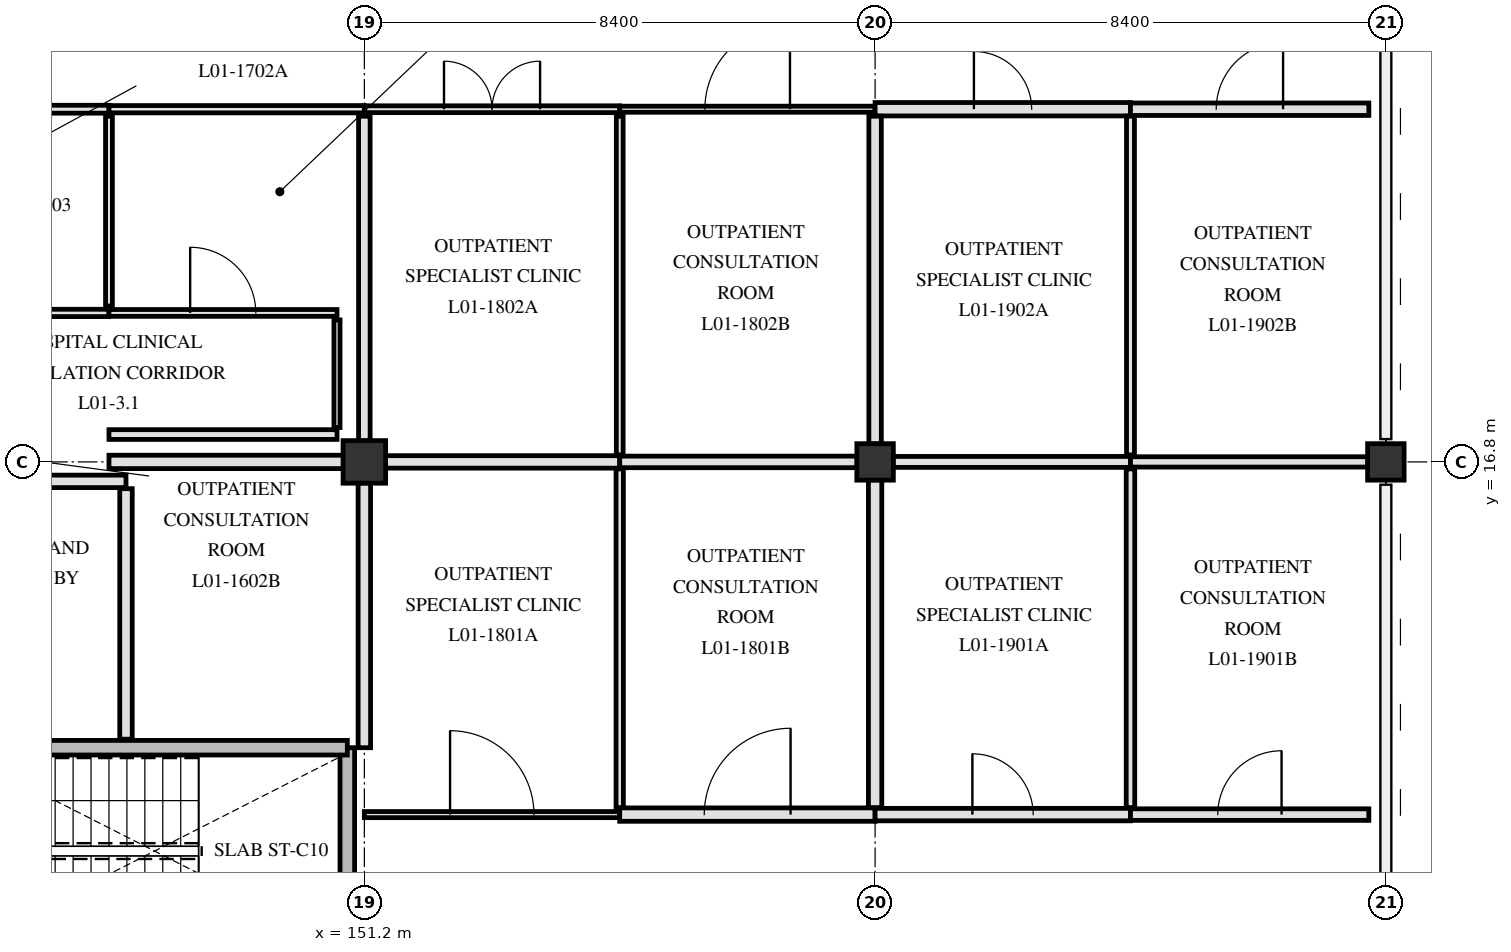
"""IFC4 building model, lengths in metres.
Left out: names, types, materials, properties, quantities, classifications, styles, units other than length and angle.
Written with IfcOpenShell. Run it as: python <this file> out.ifc"""

import sys

from ifc_helpers import new_model, si_unit, direction, frame, frame_2d, origin, origin_2d, place, context, subcontext, project, spatial, rectangle, extrude, element, fill, save


model = new_model("IFC4")
c1 = context("Model", 3, precision=1e-05, world=origin(), true_north=direction((0.0, 1.0)))
c2 = subcontext(c1, "Body", "Model", "MODEL_VIEW")
j1 = project(units=[si_unit("LENGTHUNIT", "METRE"), si_unit("PLANEANGLEUNIT", "RADIAN")], contexts=[c1])
p1 = place(None, origin())
s1 = spatial("IfcSite", under=j1, at=p1, CompositionType="ELEMENT")
p2 = place(p1, origin())
s2 = spatial("IfcBuilding", under=s1, at=p2, CompositionType="ELEMENT")
p3 = place(p2, frame((0.0, 0.0, 4.8)))
s3 = spatial("IfcBuildingStorey", under=s2, at=p3, CompositionType="ELEMENT", Elevation=4.8)
p4 = place(p3, frame((151.2, 16.8, 0.0), z_axis=(0.0, 0.0, 1.0), x_axis=(1.0, 0.0, 0.0)))
e1 = element("IfcColumn", 1, at=p4, inside=s3, PredefinedType="COLUMN", context=c2, shape_type="SweptSolid", body=[
    extrude(rectangle(XDim=0.7, YDim=0.7, at=origin_2d()), origin(), (0.0, 0.0, 1.0), 4.5),
])
for number, where, z_axis, x_axis in (
    (2, (159.6, 16.8, 0.0), (0.0, 0.0, 1.0), (1.0, 0.0, 0.0)),
    (3, (168.0, 16.8, 0.0), (0.0, 0.0, 1.0), (1.0, 0.0, 0.0)),
):
    element("IfcColumn", number, at=place(p3, frame(where, z_axis=z_axis, x_axis=x_axis)), inside=s3, PredefinedType="COLUMN", context=c2, shape_type="SweptSolid", body=[
        extrude(rectangle(XDim=0.6, YDim=0.6, at=origin_2d()), origin(), (0.0, 0.0, 1.0), 4.5),
    ])
p5 = place(p3, frame((150.92, 8.78, 0.0), z_axis=(0.0, 0.0, 1.0), x_axis=(0.0, 1.0, 0.0)))
e4 = element("IfcWall", 4, at=p5, inside=s3, PredefinedType="SHEAR", context=c2, shape_type="SweptSolid", body=[
    extrude(rectangle(XDim=3.32, YDim=0.24, at=frame_2d((1.66, 0.0))), origin(), (0.0, 0.0, 1.0), 4.15),
])
p6 = place(p3, frame((143.1, 12.1, 0.0), z_axis=(0.0, 0.0, 1.0), x_axis=(1.0, 0.0, 0.0)))
e5 = element("IfcWall", 5, at=p6, inside=s3, PredefinedType="SHEAR", context=c2, shape_type="SweptSolid", body=[
    extrude(rectangle(XDim=7.82, YDim=0.24, at=frame_2d((3.91, 0.0))), origin(), (0.0, 0.0, 1.0), 4.15),
])
p7 = place(p6, frame((0.25, 0.0, 0.0)))
e6 = element("IfcOpeningElement", 6, at=p7, cuts=e5, PredefinedType="OPENING", context=c2, shape_type="SweptSolid", body=[
    extrude(rectangle(XDim=1.45, YDim=2.2, at=frame_2d((0.725, 1.1))), frame((0.0, 0.13, 0.0), z_axis=(0.0, -1.0, 0.0), x_axis=(1.0, 0.0, 0.0)), (0.0, 0.0, 1.0), 0.26),
])
p8 = place(p3, frame((147.28, 12.24, 0.0), z_axis=(0.0, 0.0, 1.0), x_axis=(0.0, 1.0, 0.0)))
e7 = element("IfcWall", 7, at=p8, inside=s3, PredefinedType="PARTITIONING", context=c2, shape_type="SweptSolid", body=[
    extrude(rectangle(XDim=4.12, YDim=0.205, at=frame_2d((2.06, 0.0))), origin(), (0.0, 0.0, 1.0), 4.14),
])
p9 = place(p3, frame((143.1, 16.48, 0.0), z_axis=(0.0, 0.0, 1.0), x_axis=(1.0, 0.0, 0.0)))
e8 = element("IfcWall", 8, at=p9, inside=s3, PredefinedType="PARTITIONING", context=c2, shape_type="SweptSolid", body=[
    extrude(rectangle(XDim=4.18, YDim=0.205, at=frame_2d((2.09, 0.0))), origin(), (0.0, 0.0, 1.0), 3.54),
])
p10 = place(p9, frame((1.29, 0.0, 0.0)))
e9 = element("IfcOpeningElement", 9, at=p10, cuts=e8, PredefinedType="OPENING", context=c2, shape_type="SweptSolid", body=[
    extrude(rectangle(XDim=1.6, YDim=2.25, at=frame_2d((0.8, 1.125))), frame((0.0, 0.113, 0.0), z_axis=(0.0, -1.0, 0.0), x_axis=(1.0, 0.0, 0.0)), (0.0, 0.0, 1.0), 0.225),
])
p11 = place(p3, frame((151.2, 11.0, 0.0), z_axis=(0.0, 0.0, 1.0), x_axis=(1.0, 0.0, 0.0)))
e10 = element("IfcWall", 10, at=p11, inside=s3, PredefinedType="PARTITIONING", context=c2, shape_type="SweptSolid", body=[
    extrude(rectangle(XDim=4.2, YDim=0.1, at=frame_2d((2.1, 0.0))), origin(), (0.0, 0.0, 1.0), 3.59),
])
p12 = place(p11, frame((1.41, 0.0, 0.0)))
e11 = element("IfcOpeningElement", 11, at=p12, cuts=e10, PredefinedType="OPENING", context=c2, shape_type="SweptSolid", body=[
    extrude(rectangle(XDim=1.38, YDim=2.22, at=frame_2d((0.69, 1.11))), frame((0.0, 0.06, 0.0), z_axis=(0.0, -1.0, 0.0), x_axis=(1.0, 0.0, 0.0)), (0.0, 0.0, 1.0), 0.12),
])
p13 = place(p3, frame((155.4, 11.0, 0.0), z_axis=(0.0, 0.0, 1.0), x_axis=(1.0, 0.0, 0.0)))
e12 = element("IfcWall", 12, at=p13, inside=s3, PredefinedType="PARTITIONING", context=c2, shape_type="SweptSolid", body=[
    extrude(rectangle(XDim=4.2, YDim=0.22, at=frame_2d((2.1, 0.0))), origin(), (0.0, 0.0, 1.0), 3.59),
])
p14 = place(p13, frame((1.39, 0.0, 0.0)))
e13 = element("IfcOpeningElement", 13, at=p14, cuts=e12, PredefinedType="OPENING", context=c2, shape_type="SweptSolid", body=[
    extrude(rectangle(XDim=1.42, YDim=2.22, at=frame_2d((0.71, 1.11))), frame((0.0, 0.12, 0.0), z_axis=(0.0, -1.0, 0.0), x_axis=(1.0, 0.0, 0.0)), (0.0, 0.0, 1.0), 0.24),
])
p15 = place(p3, frame((159.6, 11.0, 0.0), z_axis=(0.0, 0.0, 1.0), x_axis=(1.0, 0.0, 0.0)))
e14 = element("IfcWall", 14, at=p15, inside=s3, PredefinedType="PARTITIONING", context=c2, shape_type="SweptSolid", body=[
    extrude(rectangle(XDim=4.2, YDim=0.205, at=frame_2d((2.1, 0.0))), origin(), (0.0, 0.0, 1.0), 3.59),
])
p16 = place(p15, frame((1.6, 0.0, 0.0)))
e15 = element("IfcOpeningElement", 15, at=p16, cuts=e14, PredefinedType="OPENING", context=c2, shape_type="SweptSolid", body=[
    extrude(rectangle(XDim=1.0, YDim=2.15, at=frame_2d((0.5, 1.075))), frame((0.0, 0.113, 0.0), z_axis=(0.0, -1.0, 0.0), x_axis=(1.0, 0.0, 0.0)), (0.0, 0.0, 1.0), 0.225),
])
p17 = place(p3, frame((163.8, 11.0, 0.0), z_axis=(0.0, 0.0, 1.0), x_axis=(1.0, 0.0, 0.0)))
e16 = element("IfcWall", 16, at=p17, inside=s3, PredefinedType="PARTITIONING", context=c2, shape_type="SweptSolid", body=[
    extrude(rectangle(XDim=3.92, YDim=0.19, at=frame_2d((1.96, 0.0))), origin(), (0.0, 0.0, 1.0), 4.14),
])
p18 = place(p17, frame((1.435, 0.0, 0.0)))
e17 = element("IfcOpeningElement", 17, at=p18, cuts=e16, PredefinedType="OPENING", context=c2, shape_type="SweptSolid", body=[
    extrude(rectangle(XDim=1.05, YDim=2.15, at=frame_2d((0.525, 1.075))), frame((0.0, 0.105, 0.0), z_axis=(0.0, -1.0, 0.0), x_axis=(1.0, 0.0, 0.0)), (0.0, 0.0, 1.0), 0.21),
])
p19 = place(p3, frame((147.0, 16.8, 0.0), z_axis=(0.0, 0.0, 1.0), x_axis=(1.0, 0.0, 0.0)))
e18 = element("IfcWall", 18, at=p19, inside=s3, PredefinedType="PARTITIONING", context=c2, shape_type="SweptSolid", body=[
    extrude(rectangle(XDim=3.855, YDim=0.22, at=frame_2d((1.927, 0.0))), origin(), (0.0, 0.0, 1.0), 3.54),
])
p20 = place(p3, frame((151.545, 16.8, 0.0), z_axis=(0.0, 0.0, 1.0), x_axis=(1.0, 0.0, 0.0)))
e19 = element("IfcWall", 19, at=p20, inside=s3, PredefinedType="PARTITIONING", context=c2, shape_type="SweptSolid", body=[
    extrude(rectangle(XDim=3.855, YDim=0.205, at=frame_2d((1.927, 0.0))), origin(), (0.0, 0.0, 1.0), 3.54),
])
p21 = place(p3, frame((155.4, 16.8, 0.0), z_axis=(0.0, 0.0, 1.0), x_axis=(1.0, 0.0, 0.0)))
e20 = element("IfcWall", 20, at=p21, inside=s3, PredefinedType="PARTITIONING", context=c2, shape_type="SweptSolid", body=[
    extrude(rectangle(XDim=3.905, YDim=0.19, at=frame_2d((1.953, 0.0))), origin(), (0.0, 0.0, 1.0), 3.54),
])
p22 = place(p3, frame((159.895, 16.8, 0.0), z_axis=(0.0, 0.0, 1.0), x_axis=(1.0, 0.0, 0.0)))
e21 = element("IfcWall", 21, at=p22, inside=s3, PredefinedType="PARTITIONING", context=c2, shape_type="SweptSolid", body=[
    extrude(rectangle(XDim=3.905, YDim=0.18, at=frame_2d((1.953, 0.0))), origin(), (0.0, 0.0, 1.0), 3.54),
])
p23 = place(p3, frame((163.8, 16.8, 0.0), z_axis=(0.0, 0.0, 1.0), x_axis=(1.0, 0.0, 0.0)))
e22 = element("IfcWall", 22, at=p23, inside=s3, PredefinedType="PARTITIONING", context=c2, shape_type="SweptSolid", body=[
    extrude(rectangle(XDim=3.905, YDim=0.17, at=frame_2d((1.953, 0.0))), origin(), (0.0, 0.0, 1.0), 3.54),
])
p24 = place(p3, frame((147.0, 17.25, 0.0), z_axis=(0.0, 0.0, 1.0), x_axis=(1.0, 0.0, 0.0)))
e23 = element("IfcWall", 23, at=p24, inside=s3, PredefinedType="PARTITIONING", context=c2, shape_type="SweptSolid", body=[
    extrude(rectangle(XDim=3.75, YDim=0.16, at=frame_2d((1.875, 0.0))), origin(), (0.0, 0.0, 1.0), 4.14),
])
p25 = place(p3, frame((143.25, 19.25, 0.0), z_axis=(0.0, 0.0, 1.0), x_axis=(1.0, 0.0, 0.0)))
e24 = element("IfcWall", 24, at=p25, inside=s3, PredefinedType="PARTITIONING", context=c2, shape_type="SweptSolid", body=[
    extrude(rectangle(XDim=3.75, YDim=0.12, at=frame_2d((1.875, 0.0))), origin(), (0.0, 0.0, 1.0), 4.14),
])
p26 = place(p25, frame((1.365, 0.0, 0.0)))
e25 = element("IfcOpeningElement", 25, at=p26, cuts=e24, PredefinedType="OPENING", context=c2, shape_type="SweptSolid", body=[
    extrude(rectangle(XDim=1.02, YDim=2.12, at=frame_2d((0.51, 1.06))), frame((0.0, 0.07, 0.0), z_axis=(0.0, -1.0, 0.0), x_axis=(1.0, 0.0, 0.0)), (0.0, 0.0, 1.0), 0.14),
])
p27 = place(p3, frame((147.0, 19.25, 0.0), z_axis=(0.0, 0.0, 1.0), x_axis=(1.0, 0.0, 0.0)))
e26 = element("IfcWall", 26, at=p27, inside=s3, PredefinedType="PARTITIONING", context=c2, shape_type="SweptSolid", body=[
    extrude(rectangle(XDim=3.75, YDim=0.112, at=frame_2d((1.875, 0.0))), origin(), (0.0, 0.0, 1.0), 4.14),
])
p28 = place(p27, frame((1.335, 0.0, 0.0)))
e27 = element("IfcOpeningElement", 27, at=p28, cuts=e26, PredefinedType="OPENING", context=c2, shape_type="SweptSolid", body=[
    extrude(rectangle(XDim=1.08, YDim=2.12, at=frame_2d((0.54, 1.06))), frame((0.0, 0.066, 0.0), z_axis=(0.0, -1.0, 0.0), x_axis=(1.0, 0.0, 0.0)), (0.0, 0.0, 1.0), 0.132),
])
p29 = place(p3, frame((142.8, 22.6, 0.0), z_axis=(0.0, 0.0, 1.0), x_axis=(1.0, 0.0, 0.0)))
e28 = element("IfcWall", 28, at=p29, inside=s3, PredefinedType="PARTITIONING", context=c2, shape_type="SweptSolid", body=[
    extrude(rectangle(XDim=4.2, YDim=0.13, at=frame_2d((2.1, 0.0))), origin(), (0.0, 0.0, 1.0), 3.59),
])
p30 = place(p3, frame((147.0, 22.6, 0.0), z_axis=(0.0, 0.0, 1.0), x_axis=(1.0, 0.0, 0.0)))
e29 = element("IfcWall", 29, at=p30, inside=s3, PredefinedType="PARTITIONING", context=c2, shape_type="SweptSolid", body=[
    extrude(rectangle(XDim=4.2, YDim=0.12, at=frame_2d((2.1, 0.0))), origin(), (0.0, 0.0, 1.0), 3.59),
])
p31 = place(p3, frame((151.2, 22.6, 0.0), z_axis=(0.0, 0.0, 1.0), x_axis=(1.0, 0.0, 0.0)))
e30 = element("IfcWall", 30, at=p31, inside=s3, PredefinedType="PARTITIONING", context=c2, shape_type="SweptSolid", body=[
    extrude(rectangle(XDim=4.2, YDim=0.112, at=frame_2d((2.1, 0.0))), origin(), (0.0, 0.0, 1.0), 3.59),
])
p32 = place(p31, frame((1.31, 0.0, 0.0)))
e31 = element("IfcOpeningElement", 31, at=p32, cuts=e30, PredefinedType="OPENING", context=c2, shape_type="SweptSolid", body=[
    extrude(rectangle(XDim=1.58, YDim=2.22, at=frame_2d((0.79, 1.11))), frame((0.0, 0.066, 0.0), z_axis=(0.0, -1.0, 0.0), x_axis=(1.0, 0.0, 0.0)), (0.0, 0.0, 1.0), 0.132),
])
p33 = place(p3, frame((155.4, 22.6, 0.0), z_axis=(0.0, 0.0, 1.0), x_axis=(1.0, 0.0, 0.0)))
e32 = element("IfcWall", 32, at=p33, inside=s3, PredefinedType="PARTITIONING", context=c2, shape_type="SweptSolid", body=[
    extrude(rectangle(XDim=4.2, YDim=0.1, at=frame_2d((2.1, 0.0))), origin(), (0.0, 0.0, 1.0), 3.59),
])
p34 = place(p33, frame((1.4, 0.0, 0.0)))
e33 = element("IfcOpeningElement", 33, at=p34, cuts=e32, PredefinedType="OPENING", context=c2, shape_type="SweptSolid", body=[
    extrude(rectangle(XDim=1.4, YDim=2.2, at=frame_2d((0.7, 1.1))), frame((0.0, 0.06, 0.0), z_axis=(0.0, -1.0, 0.0), x_axis=(1.0, 0.0, 0.0)), (0.0, 0.0, 1.0), 0.12),
])
p35 = place(p3, frame((159.6, 22.6, 0.0), z_axis=(0.0, 0.0, 1.0), x_axis=(1.0, 0.0, 0.0)))
e34 = element("IfcWall", 34, at=p35, inside=s3, PredefinedType="PARTITIONING", context=c2, shape_type="SweptSolid", body=[
    extrude(rectangle(XDim=4.2, YDim=0.22, at=frame_2d((2.1, 0.0))), origin(), (0.0, 0.0, 1.0), 3.59),
])
p36 = place(p35, frame((1.625, 0.0, 0.0)))
e35 = element("IfcOpeningElement", 35, at=p36, cuts=e34, PredefinedType="OPENING", context=c2, shape_type="SweptSolid", body=[
    extrude(rectangle(XDim=0.95, YDim=2.1, at=frame_2d((0.475, 1.05))), frame((0.0, 0.12, 0.0), z_axis=(0.0, -1.0, 0.0), x_axis=(1.0, 0.0, 0.0)), (0.0, 0.0, 1.0), 0.24),
])
p37 = place(p3, frame((163.8, 22.6, 0.0), z_axis=(0.0, 0.0, 1.0), x_axis=(1.0, 0.0, 0.0)))
e36 = element("IfcWall", 36, at=p37, inside=s3, PredefinedType="PARTITIONING", context=c2, shape_type="SweptSolid", body=[
    extrude(rectangle(XDim=3.92, YDim=0.205, at=frame_2d((1.96, 0.0))), origin(), (0.0, 0.0, 1.0), 4.14),
])
p38 = place(p37, frame((1.41, 0.0, 0.0)))
e37 = element("IfcOpeningElement", 37, at=p38, cuts=e36, PredefinedType="OPENING", context=c2, shape_type="SweptSolid", body=[
    extrude(rectangle(XDim=1.1, YDim=2.15, at=frame_2d((0.55, 1.075))), frame((0.0, 0.113, 0.0), z_axis=(0.0, -1.0, 0.0), x_axis=(1.0, 0.0, 0.0)), (0.0, 0.0, 1.0), 0.225),
])
p39 = place(p3, frame((147.0, 19.365, 0.0), z_axis=(0.0, 0.0, 1.0), x_axis=(0.0, 1.0, 0.0)))
e38 = element("IfcWall", 38, at=p39, inside=s3, PredefinedType="PARTITIONING", context=c2, shape_type="SweptSolid", body=[
    extrude(rectangle(XDim=3.12, YDim=0.112, at=frame_2d((1.56, 0.0))), origin(), (0.0, 0.0, 1.0), 4.14),
])
p40 = place(p3, frame((150.75, 17.365, 0.0), z_axis=(0.0, 0.0, 1.0), x_axis=(0.0, 1.0, 0.0)))
e39 = element("IfcWall", 39, at=p40, inside=s3, PredefinedType="PARTITIONING", context=c2, shape_type="SweptSolid", body=[
    extrude(rectangle(XDim=1.77, YDim=0.1, at=frame_2d((0.885, 0.0))), origin(), (0.0, 0.0, 1.0), 4.14),
])
p41 = place(p3, frame((151.2, 12.1, 0.0), z_axis=(0.0, 0.0, 1.0), x_axis=(0.0, 1.0, 0.0)))
e40 = element("IfcWall", 40, at=p41, inside=s3, PredefinedType="PARTITIONING", context=c2, shape_type="SweptSolid", body=[
    extrude(rectangle(XDim=4.355, YDim=0.205, at=frame_2d((2.177, 0.0))), origin(), (0.0, 0.0, 1.0), 3.59),
])
p42 = place(p3, frame((151.2, 17.145, 0.0), z_axis=(0.0, 0.0, 1.0), x_axis=(0.0, 1.0, 0.0)))
e41 = element("IfcWall", 41, at=p42, inside=s3, PredefinedType="PARTITIONING", context=c2, shape_type="SweptSolid", body=[
    extrude(rectangle(XDim=5.34, YDim=0.19, at=frame_2d((2.67, 0.0))), origin(), (0.0, 0.0, 1.0), 3.59),
])
p43 = place(p3, frame((155.4, 11.115, 0.0), z_axis=(0.0, 0.0, 1.0), x_axis=(0.0, 1.0, 0.0)))
e42 = element("IfcWall", 42, at=p43, inside=s3, PredefinedType="PARTITIONING", context=c2, shape_type="SweptSolid", body=[
    extrude(rectangle(XDim=5.57, YDim=0.12, at=frame_2d((2.785, 0.0))), origin(), (0.0, 0.0, 1.0), 3.54),
])
p44 = place(p3, frame((155.4, 16.915, 0.0), z_axis=(0.0, 0.0, 1.0), x_axis=(0.0, 1.0, 0.0)))
e43 = element("IfcWall", 43, at=p44, inside=s3, PredefinedType="PARTITIONING", context=c2, shape_type="SweptSolid", body=[
    extrude(rectangle(XDim=5.57, YDim=0.112, at=frame_2d((2.785, 0.0))), origin(), (0.0, 0.0, 1.0), 3.54),
])
p45 = place(p3, frame((159.6, 11.115, 0.0), z_axis=(0.0, 0.0, 1.0), x_axis=(0.0, 1.0, 0.0)))
e44 = element("IfcWall", 44, at=p45, inside=s3, PredefinedType="PARTITIONING", context=c2, shape_type="SweptSolid", body=[
    extrude(rectangle(XDim=5.39, YDim=0.22, at=frame_2d((2.695, 0.0))), origin(), (0.0, 0.0, 1.0), 3.59),
])
p46 = place(p3, frame((159.6, 17.095, 0.0), z_axis=(0.0, 0.0, 1.0), x_axis=(0.0, 1.0, 0.0)))
e45 = element("IfcWall", 45, at=p46, inside=s3, PredefinedType="PARTITIONING", context=c2, shape_type="SweptSolid", body=[
    extrude(rectangle(XDim=5.39, YDim=0.205, at=frame_2d((2.695, 0.0))), origin(), (0.0, 0.0, 1.0), 3.59),
])
p47 = place(p3, frame((163.8, 11.115, 0.0), z_axis=(0.0, 0.0, 1.0), x_axis=(0.0, 1.0, 0.0)))
e46 = element("IfcWall", 46, at=p47, inside=s3, PredefinedType="PARTITIONING", context=c2, shape_type="SweptSolid", body=[
    extrude(rectangle(XDim=5.57, YDim=0.14, at=frame_2d((2.785, 0.0))), origin(), (0.0, 0.0, 1.0), 3.54),
])
p48 = place(p3, frame((163.8, 16.915, 0.0), z_axis=(0.0, 0.0, 1.0), x_axis=(0.0, 1.0, 0.0)))
e47 = element("IfcWall", 47, at=p48, inside=s3, PredefinedType="PARTITIONING", context=c2, shape_type="SweptSolid", body=[
    extrude(rectangle(XDim=5.57, YDim=0.13, at=frame_2d((2.785, 0.0))), origin(), (0.0, 0.0, 1.0), 3.54),
])
p49 = place(p28, origin())
e48 = element("IfcDoor", 48, at=p49, inside=s3, OperationType="SINGLE_SWING_LEFT", PredefinedType="DOOR", context=c2, shape_type="SweptSolid", body=[
    extrude(rectangle(XDim=1.08, YDim=2.12, at=frame_2d((0.54, 1.06))), frame((0.0, 0.025, 0.0), z_axis=(0.0, -1.0, 0.0), x_axis=(1.0, 0.0, 0.0)), (0.0, 0.0, 1.0), 0.05),
])
fill(e27, e48)
p50 = place(p12, origin())
e49 = element("IfcDoor", 49, at=p50, inside=s3, OperationType="SINGLE_SWING_LEFT", PredefinedType="DOOR", context=c2, shape_type="SweptSolid", body=[
    extrude(rectangle(XDim=1.38, YDim=2.22, at=frame_2d((0.69, 1.11))), frame((0.0, 0.025, 0.0), z_axis=(0.0, -1.0, 0.0), x_axis=(1.0, 0.0, 0.0)), (0.0, 0.0, 1.0), 0.05),
])
fill(e11, e49)
p51 = place(p14, origin())
e50 = element("IfcDoor", 50, at=p51, inside=s3, OperationType="SINGLE_SWING_RIGHT", PredefinedType="DOOR", context=c2, shape_type="SweptSolid", body=[
    extrude(rectangle(XDim=1.42, YDim=2.22, at=frame_2d((0.71, 1.11))), frame((0.0, 0.025, 0.0), z_axis=(0.0, -1.0, 0.0), x_axis=(1.0, 0.0, 0.0)), (0.0, 0.0, 1.0), 0.05),
])
fill(e13, e50)
p52 = place(p32, origin())
e51 = element("IfcDoor", 51, at=p52, inside=s3, OperationType="DOUBLE_SWING_LEFT", PredefinedType="DOOR", context=c2, shape_type="SweptSolid", body=[
    extrude(rectangle(XDim=1.58, YDim=2.22, at=frame_2d((0.79, 1.11))), frame((0.0, 0.025, 0.0), z_axis=(0.0, -1.0, 0.0), x_axis=(1.0, 0.0, 0.0)), (0.0, 0.0, 1.0), 0.05),
])
fill(e31, e51)
p53 = place(p34, origin())
e52 = element("IfcDoor", 52, at=p53, inside=s3, OperationType="SINGLE_SWING_RIGHT", PredefinedType="DOOR", context=c2, shape_type="SweptSolid", body=[
    extrude(rectangle(XDim=1.4, YDim=2.2, at=frame_2d((0.7, 1.1))), frame((0.0, 0.025, 0.0), z_axis=(0.0, -1.0, 0.0), x_axis=(1.0, 0.0, 0.0)), (0.0, 0.0, 1.0), 0.05),
])
fill(e33, e52)
p54 = place(p16, origin())
e53 = element("IfcDoor", 53, at=p54, inside=s3, OperationType="SINGLE_SWING_LEFT", PredefinedType="DOOR", context=c2, shape_type="SweptSolid", body=[
    extrude(rectangle(XDim=1.0, YDim=2.15, at=frame_2d((0.5, 1.075))), frame((0.0, 0.025, 0.0), z_axis=(0.0, -1.0, 0.0), x_axis=(1.0, 0.0, 0.0)), (0.0, 0.0, 1.0), 0.05),
])
fill(e15, e53)
p55 = place(p18, origin())
e54 = element("IfcDoor", 54, at=p55, inside=s3, OperationType="SINGLE_SWING_RIGHT", PredefinedType="DOOR", context=c2, shape_type="SweptSolid", body=[
    extrude(rectangle(XDim=1.05, YDim=2.15, at=frame_2d((0.525, 1.075))), frame((0.0, 0.025, 0.0), z_axis=(0.0, -1.0, 0.0), x_axis=(1.0, 0.0, 0.0)), (0.0, 0.0, 1.0), 0.05),
])
fill(e17, e54)
p56 = place(p36, origin())
e55 = element("IfcDoor", 55, at=p56, inside=s3, OperationType="SINGLE_SWING_LEFT", PredefinedType="DOOR", context=c2, shape_type="SweptSolid", body=[
    extrude(rectangle(XDim=0.95, YDim=2.1, at=frame_2d((0.475, 1.05))), frame((0.0, 0.025, 0.0), z_axis=(0.0, -1.0, 0.0), x_axis=(1.0, 0.0, 0.0)), (0.0, 0.0, 1.0), 0.05),
])
fill(e35, e55)
p57 = place(p38, origin())
e56 = element("IfcDoor", 56, at=p57, inside=s3, OperationType="SINGLE_SWING_RIGHT", PredefinedType="DOOR", context=c2, shape_type="SweptSolid", body=[
    extrude(rectangle(XDim=1.1, YDim=2.15, at=frame_2d((0.55, 1.075))), frame((0.0, 0.025, 0.0), z_axis=(0.0, -1.0, 0.0), x_axis=(1.0, 0.0, 0.0)), (0.0, 0.0, 1.0), 0.05),
])
fill(e37, e56)
save(model, sys.argv[1])
